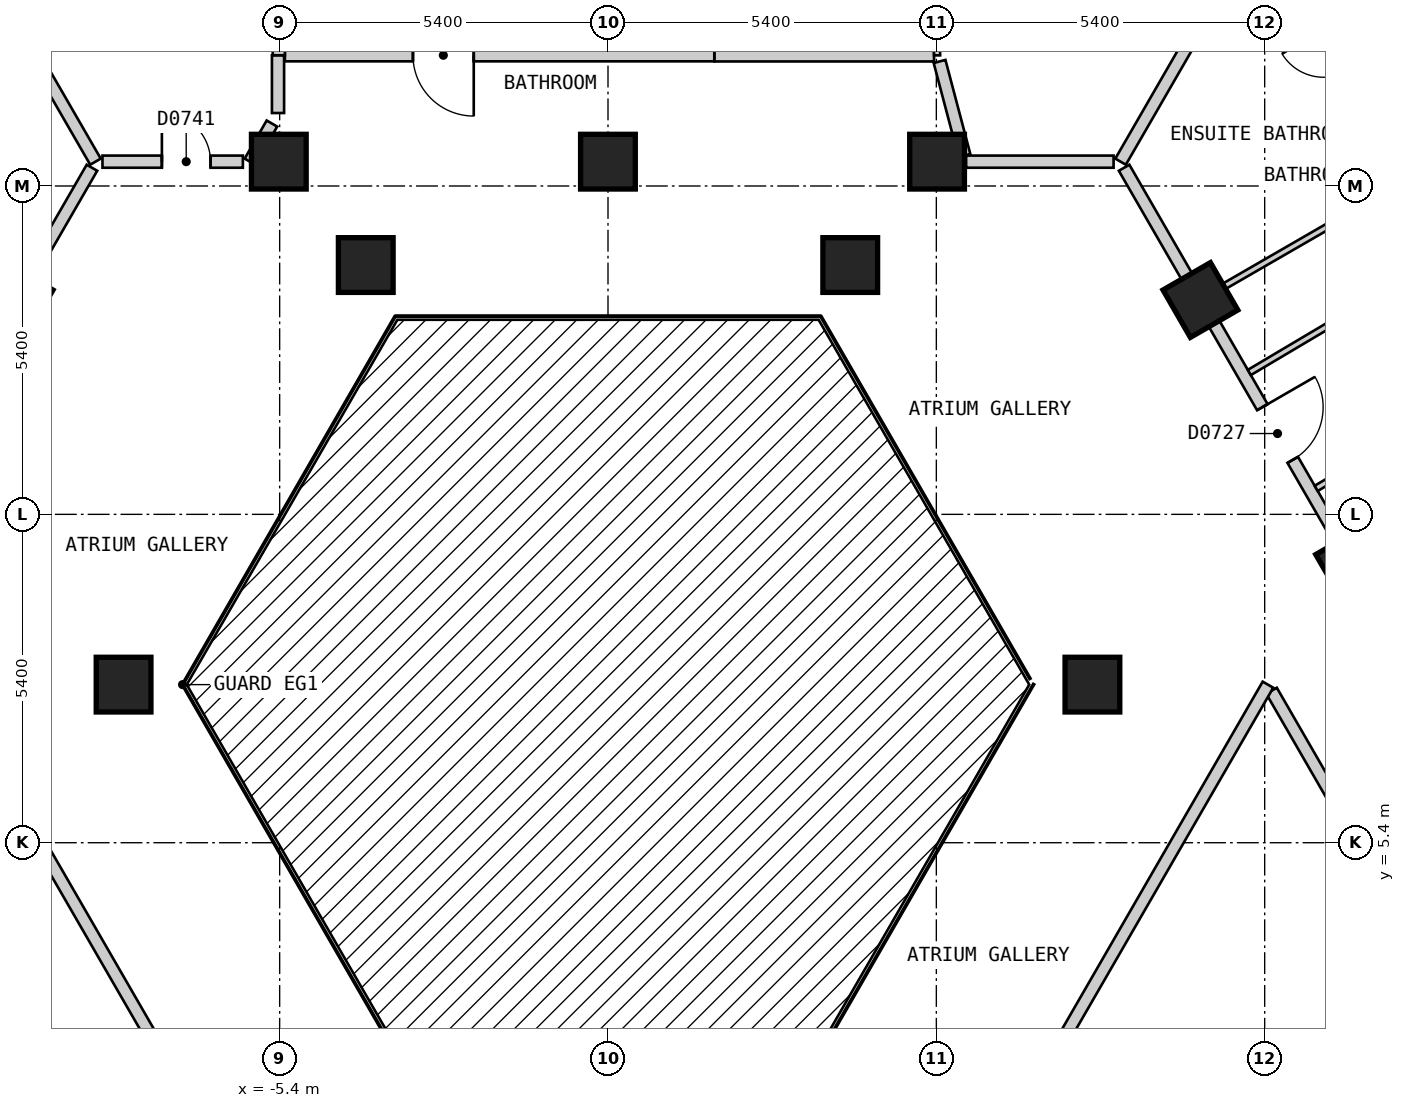
"""IFC4 building model, lengths in metres.
Left out: names, types, materials, properties, quantities, classifications, styles, units other than length and angle.
Written with IfcOpenShell. Run it as: python <this file> out.ifc"""

import sys

from ifc_helpers import new_model, si_unit, direction, frame, frame_2d, origin, origin_2d, place, context, subcontext, project, spatial, rectangle, extrude, element, fill, save


model = new_model("IFC4")
c1 = context("Model", 3, precision=1e-05, world=origin(), true_north=direction((0.0, 1.0)))
c2 = subcontext(c1, "Body", "Model", "MODEL_VIEW")
j1 = project(units=[si_unit("LENGTHUNIT", "METRE"), si_unit("PLANEANGLEUNIT", "RADIAN")], contexts=[c1])
p1 = place(None, origin())
s1 = spatial("IfcSite", under=j1, at=p1, CompositionType="ELEMENT")
p2 = place(p1, origin())
s2 = spatial("IfcBuilding", under=s1, at=p2, CompositionType="ELEMENT")
p3 = place(p2, frame((0.0, 0.0, 105.0)))
s3 = spatial("IfcBuildingStorey", under=s2, at=p3, CompositionType="ELEMENT", Elevation=105.0)
for number, where, z_axis, x_axis in (
    (1, (12.255, 9.975, 0.0), (0.0, 0.0, 1.0), (-0.5, 0.866, 0.0)),
    (2, (7.967, 8.0, 0.0), (0.0, 0.0, 1.0), (1.0, 0.0, 0.0)),
    (3, (9.743, 14.325, 0.0), (0.0, 0.0, 1.0), (-0.5, 0.866, 0.0)),
    (4, (5.412, 16.6, 0.0), (0.0, 0.0, 1.0), (-1.0, 0.0, 0.0)),
    (5, (3.984, 14.9, 0.0), (0.0, 0.0, 1.0), (1.0, 0.0, 0.0)),
    (6, (-0.001, 16.6, 0.0), (0.0, 0.0, 1.0), (-1.0, 0.0, 0.0)),
    (7, (-3.984, 14.9, 0.0), (0.0, 0.0, 1.0), (1.0, 0.0, 0.0)),
    (8, (-5.414, 16.6, 0.0), (0.0, 0.0, 1.0), (-1.0, 0.0, 0.0)),
    (9, (-9.743, 14.325, 0.0), (0.0, 0.0, 1.0), (-0.5, -0.866, 0.0)),
    (10, (-7.967, 8.0, 0.0), (0.0, 0.0, 1.0), (1.0, 0.0, 0.0)),
):
    element("IfcColumn", number, at=place(p3, frame(where, z_axis=z_axis, x_axis=x_axis)), inside=s3, PredefinedType="COLUMN", context=c2, shape_type="SweptSolid", body=[
        extrude(rectangle(XDim=0.9, YDim=0.9, at=origin_2d()), origin(), (0.0, 0.0, 1.0), 3.0),
    ])
p4 = place(p3, frame((-10.796, 7.899, 0.0), z_axis=(0.0, 0.0, 1.0), x_axis=(0.500010383074, -0.866019409031, 0.0)))
e11 = element("IfcWall", 11, at=p4, inside=s3, PredefinedType="PARTITIONING", context=c2, shape_type="SweptSolid", body=[
    extrude(rectangle(XDim=7.535, YDim=0.2, at=frame_2d((3.768, 0.0))), origin(), (0.0, 0.0, 1.0), 2.6),
])
p5 = place(p3, frame((5.453, 18.248, 0.0), z_axis=(0.0, 0.0, 1.0), x_axis=(0.255687088482, -0.9667595941, 0.0)))
e12 = element("IfcWall", 12, at=p5, inside=s3, PredefinedType="PARTITIONING", context=c2, shape_type="SweptSolid", body=[
    extrude(rectangle(XDim=1.6, YDim=0.2, at=frame_2d((0.8, 0.0))), origin(), (0.0, 0.0, 1.0), 2.6),
])
p6 = place(p3, frame((10.913, 7.899, 0.0), z_axis=(0.0, 0.0, 1.0), x_axis=(0.500028940566, -0.866008694296, 0.0)))
e13 = element("IfcWall", 13, at=p6, inside=s3, PredefinedType="PARTITIONING", context=c2, shape_type="SweptSolid", body=[
    extrude(rectangle(XDim=10.159, YDim=0.2, at=frame_2d((5.08, 0.0))), origin(), (0.0, 0.0, 1.0), 2.6),
])
p7 = place(p6, frame((4.63, 0.0, 0.0)))
e14 = element("IfcOpeningElement", 14, at=p7, cuts=e13, PredefinedType="OPENING", context=c2, shape_type="SweptSolid", body=[
    extrude(rectangle(XDim=0.9, YDim=2.1, at=frame_2d((0.45, 1.05))), frame((0.0, 0.11, 0.0), z_axis=(0.0, -1.0, 0.0), x_axis=(1.0, 0.0, 0.0)), (0.0, 0.0, 1.0), 0.22),
])
p8 = place(p3, frame((8.488, 16.5, 0.0), z_axis=(0.0, 0.0, 1.0), x_axis=(0.499986836607, -0.86603300354, 0.0)))
e15 = element("IfcWall", 15, at=p8, inside=s3, PredefinedType="PARTITIONING", context=c2, shape_type="SweptSolid", body=[
    extrude(rectangle(XDim=20.09, YDim=0.2, at=frame_2d((10.045, 0.0))), origin(), (0.0, 0.0, 1.0), 2.6),
])
p9 = place(p8, frame((14.569, 0.0, 0.0)))
e16 = element("IfcOpeningElement", 16, at=p9, cuts=e15, PredefinedType="OPENING", context=c2, shape_type="SweptSolid", body=[
    extrude(rectangle(XDim=1.0, YDim=2.1, at=frame_2d((0.5, 1.05))), frame((0.0, 0.11, 0.0), z_axis=(0.0, -1.0, 0.0), x_axis=(1.0, 0.0, 0.0)), (0.0, 0.0, 1.0), 0.22),
])
p10 = place(p8, frame((4.547, 0.0, 0.0)))
e17 = element("IfcOpeningElement", 17, at=p10, cuts=e15, PredefinedType="OPENING", context=c2, shape_type="SweptSolid", body=[
    extrude(rectangle(XDim=1.0, YDim=2.1, at=frame_2d((0.5, 1.05))), frame((0.0, 0.11, 0.0), z_axis=(0.0, -1.0, 0.0), x_axis=(1.0, 0.0, 0.0)), (0.0, 0.0, 1.0), 0.22),
])
p11 = place(p3, frame((-8.314, 16.6, 0.0), z_axis=(0.0, 0.0, 1.0), x_axis=(1.0, 0.0, 0.0)))
e18 = element("IfcWall", 18, at=p11, inside=s3, PredefinedType="PARTITIONING", context=c2, shape_type="SweptSolid", body=[
    extrude(rectangle(XDim=2.309, YDim=0.2, at=frame_2d((1.155, 0.0))), origin(), (0.0, 0.0, 1.0), 2.6),
])
p12 = place(p11, frame((0.977, 0.0, 0.0)))
e19 = element("IfcOpeningElement", 19, at=p12, cuts=e18, PredefinedType="OPENING", context=c2, shape_type="SweptSolid", body=[
    extrude(rectangle(XDim=0.8, YDim=2.1, at=frame_2d((0.4, 1.05))), frame((0.0, 0.11, 0.0), z_axis=(0.0, -1.0, 0.0), x_axis=(1.0, 0.0, 0.0)), (0.0, 0.0, 1.0), 0.22),
])
p13 = place(p3, frame((5.889, 16.6, 0.0), z_axis=(0.0, 0.0, 1.0), x_axis=(1.0, 0.0, 0.0)))
e20 = element("IfcWall", 20, at=p13, inside=s3, PredefinedType="PARTITIONING", context=c2, shape_type="SweptSolid", body=[
    extrude(rectangle(XDim=2.426, YDim=0.2, at=frame_2d((1.213, 0.0))), origin(), (0.0, 0.0, 1.0), 2.6),
])
p14 = place(p3, frame((1.75, 18.348, 0.0), z_axis=(0.0, 0.0, 1.0), x_axis=(1.0, 0.0, 0.0)))
e21 = element("IfcWall", 21, at=p14, inside=s3, PredefinedType="PARTITIONING", context=c2, shape_type="SweptSolid", body=[
    extrude(rectangle(XDim=3.612, YDim=0.2, at=frame_2d((1.806, 0.0))), origin(), (0.0, 0.0, 1.0), 2.6),
])
p15 = place(p3, frame((-5.314, 18.35, 0.0), z_axis=(0.0, 0.0, 1.0), x_axis=(1.0, 0.0, 0.0)))
e22 = element("IfcWall", 22, at=p15, inside=s3, PredefinedType="PARTITIONING", context=c2, shape_type="SweptSolid", body=[
    extrude(rectangle(XDim=7.062, YDim=0.2, at=frame_2d((3.531, 0.0))), origin(), (0.0, 0.0, 1.0), 2.6),
])
p16 = place(p15, frame((2.106, 0.0, 0.0)))
e23 = element("IfcOpeningElement", 23, at=p16, cuts=e22, PredefinedType="OPENING", context=c2, shape_type="SweptSolid", body=[
    extrude(rectangle(XDim=1.0, YDim=2.1, at=frame_2d((0.5, 1.05))), frame((0.0, 0.11, 0.0), z_axis=(0.0, -1.0, 0.0), x_axis=(1.0, 0.0, 0.0)), (0.0, 0.0, 1.0), 0.22),
])
p17 = place(p3, frame((6.928, 1.2, 0.0), z_axis=(0.0, 0.0, 1.0), x_axis=(0.500055327065, 0.865993458332, 0.0)))
e24 = element("IfcWall", 24, at=p17, inside=s3, PredefinedType="PARTITIONING", context=c2, shape_type="SweptSolid", body=[
    extrude(rectangle(XDim=7.851, YDim=0.2, at=frame_2d((3.926, 0.0))), origin(), (0.0, 0.0, 1.0), 2.6),
])
p18 = place(p3, frame((-5.889, 16.6, 0.0), z_axis=(0.0, 0.0, 1.0), x_axis=(0.499839240638, 0.866118198353, 0.0)))
e25 = element("IfcWall", 25, at=p18, inside=s3, PredefinedType="PARTITIONING", context=c2, shape_type="SweptSolid", body=[
    extrude(rectangle(XDim=0.724, YDim=0.2, at=frame_2d((0.362, 0.0))), origin(), (0.0, 0.0, 1.0), 2.6),
])
p19 = place(p3, frame((-18.533, -0.901, 0.0), z_axis=(0.0, 0.0, 1.0), x_axis=(0.499981198768, 0.866036258409, 0.0)))
e26 = element("IfcWall", 26, at=p19, inside=s3, PredefinedType="PARTITIONING", context=c2, shape_type="SweptSolid", body=[
    extrude(rectangle(XDim=20.093, YDim=0.2, at=frame_2d((10.046, 0.0))), origin(), (0.0, 0.0, 1.0), 2.6),
])
p20 = place(p19, frame((14.57, 0.0, 0.0)))
e27 = element("IfcOpeningElement", 27, at=p20, cuts=e26, PredefinedType="OPENING", context=c2, shape_type="SweptSolid", body=[
    extrude(rectangle(XDim=1.0, YDim=2.1, at=frame_2d((0.5, 1.05))), frame((0.0, 0.11, 0.0), z_axis=(0.0, -1.0, 0.0), x_axis=(1.0, 0.0, 0.0)), (0.0, 0.0, 1.0), 0.22),
])
p21 = place(p19, frame((4.523, 0.0, 0.0)))
e28 = element("IfcOpeningElement", 28, at=p21, cuts=e26, PredefinedType="OPENING", context=c2, shape_type="SweptSolid", body=[
    extrude(rectangle(XDim=1.0, YDim=2.1, at=frame_2d((0.5, 1.05))), frame((0.0, 0.11, 0.0), z_axis=(0.0, -1.0, 0.0), x_axis=(1.0, 0.0, 0.0)), (0.0, 0.0, 1.0), 0.22),
])
p22 = place(p3, frame((-5.427, 17.4, 0.0), z_axis=(0.0, 0.0, 1.0), x_axis=(0.0, 1.0, 0.0)))
e29 = element("IfcWall", 29, at=p22, inside=s3, PredefinedType="PARTITIONING", context=c2, shape_type="SweptSolid", body=[
    extrude(rectangle(XDim=0.95, YDim=0.2, at=frame_2d((0.475, 0.0))), origin(), (0.0, 0.0, 1.0), 2.6),
])
p23 = place(p3, frame((10.706, 20.543, 0.0), z_axis=(0.0, 0.0, 1.0), x_axis=(0.518240414093, -0.855234981278, 0.0)))
e30 = element("IfcWall", 30, at=p23, inside=s3, PredefinedType="PARTITIONING", context=c2, shape_type="SweptSolid", body=[
    extrude(rectangle(XDim=4.855, YDim=0.1, at=frame_2d((2.427, 0.0))), origin(), (0.0, 0.0, 1.0), 2.6),
])
p24 = place(p23, frame((2.052, 0.0, 0.0)))
e31 = element("IfcOpeningElement", 31, at=p24, cuts=e30, PredefinedType="OPENING", context=c2, shape_type="SweptSolid", body=[
    extrude(rectangle(XDim=0.8, YDim=2.1, at=frame_2d((0.4, 1.05))), frame((0.0, 0.06, 0.0), z_axis=(0.0, -1.0, 0.0), x_axis=(1.0, 0.0, 0.0)), (0.0, 0.0, 1.0), 0.12),
])
p25 = place(p3, frame((5.412, 22.005, 0.0), z_axis=(0.0, 0.0, 1.0), x_axis=(0.0, -1.0, 0.0)))
e32 = element("IfcWall", 32, at=p25, inside=s3, PredefinedType="PARTITIONING", context=c2, shape_type="SweptSolid", body=[
    extrude(rectangle(XDim=3.657, YDim=0.1, at=frame_2d((1.829, 0.0))), origin(), (0.0, 0.0, 1.0), 2.6),
])
p26 = place(p3, frame((9.83, 14.375, 0.0), z_axis=(0.0, 0.0, 1.0), x_axis=(0.866016855193, 0.500014806302, 0.0)))
e33 = element("IfcWall", 33, at=p26, inside=s3, PredefinedType="PARTITIONING", context=c2, shape_type="SweptSolid", body=[
    extrude(rectangle(XDim=10.0, YDim=0.1, at=frame_2d((5.0, 0.0))), origin(), (0.0, 0.0, 1.0), 2.6),
])
p27 = place(p26, frame((6.523, 0.0, 0.0)))
e34 = element("IfcOpeningElement", 34, at=p27, cuts=e33, PredefinedType="OPENING", context=c2, shape_type="SweptSolid", body=[
    extrude(rectangle(XDim=0.9, YDim=2.1, at=frame_2d((0.45, 1.05))), frame((0.0, 0.06, 0.0), z_axis=(0.0, -1.0, 0.0), x_axis=(1.0, 0.0, 0.0)), (0.0, 0.0, 1.0), 0.12),
])
p28 = place(p3, frame((11.647, 11.227, 0.0), z_axis=(0.0, 0.0, 1.0), x_axis=(0.859997349349, 0.510298500011, 0.0)))
e35 = element("IfcWall", 35, at=p28, inside=s3, PredefinedType="PARTITIONING", context=c2, shape_type="SweptSolid", body=[
    extrude(rectangle(XDim=3.898, YDim=0.1, at=frame_2d((1.949, 0.0))), origin(), (0.0, 0.0, 1.0), 2.6),
])
p29 = place(p28, frame((1.473, 0.0, 0.0)))
e36 = element("IfcOpeningElement", 36, at=p29, cuts=e35, PredefinedType="OPENING", context=c2, shape_type="SweptSolid", body=[
    extrude(rectangle(XDim=0.9, YDim=2.1, at=frame_2d((0.45, 1.05))), frame((0.0, 0.06, 0.0), z_axis=(0.0, -1.0, 0.0), x_axis=(1.0, 0.0, 0.0)), (0.0, 0.0, 1.0), 0.12),
])
p30 = place(p3, frame((10.547, 13.133, 0.0), z_axis=(0.0, 0.0, 1.0), x_axis=(0.860090994311, 0.510140648749, 0.0)))
e37 = element("IfcWall", 37, at=p30, inside=s3, PredefinedType="PARTITIONING", context=c2, shape_type="SweptSolid", body=[
    extrude(rectangle(XDim=3.897, YDim=0.1, at=frame_2d((1.948, 0.0))), origin(), (0.0, 0.0, 1.0), 2.6),
])
p31 = place(p30, frame((1.523, 0.0, 0.0)))
e38 = element("IfcOpeningElement", 38, at=p31, cuts=e37, PredefinedType="OPENING", context=c2, shape_type="SweptSolid", body=[
    extrude(rectangle(XDim=0.8, YDim=2.1, at=frame_2d((0.4, 1.05))), frame((0.0, 0.06, 0.0), z_axis=(0.0, -1.0, 0.0), x_axis=(1.0, 0.0, 0.0)), (0.0, 0.0, 1.0), 0.12),
])
p32 = place(p3, frame((-10.727, 20.58, 0.0), z_axis=(0.0, 0.0, 1.0), x_axis=(0.500041272028, -0.866001574057, 0.0)))
e39 = element("IfcWall", 39, at=p32, inside=s3, PredefinedType="PARTITIONING", context=c2, shape_type="SweptSolid", body=[
    extrude(rectangle(XDim=4.596, YDim=0.2, at=frame_2d((2.298, 0.0))), origin(), (0.0, 0.0, 1.0), 2.6),
])
p33 = place(p3, frame((-5.414, 26.7, 0.0), z_axis=(0.0, 0.0, 1.0), x_axis=(0.0, -1.0, 0.0)))
e40 = element("IfcWall", 40, at=p33, inside=s3, PredefinedType="PARTITIONING", context=c2, shape_type="SweptSolid", body=[
    extrude(rectangle(XDim=8.35, YDim=0.2, at=frame_2d((4.175, 0.0))), origin(), (0.0, 0.0, 1.0), 2.6),
])
p34 = place(p3, frame((8.43, 16.6, 0.0), z_axis=(0.0, 0.0, 1.0), x_axis=(0.500072613115, 0.865983476524, 0.0)))
e41 = element("IfcWall", 41, at=p34, inside=s3, PredefinedType="PARTITIONING", context=c2, shape_type="SweptSolid", body=[
    extrude(rectangle(XDim=4.385, YDim=0.2, at=frame_2d((2.193, 0.0))), origin(), (0.0, 0.0, 1.0), 2.6),
])
p35 = place(p10, origin())
e42 = element("IfcDoor", 42, at=p35, inside=s3, OperationType="SINGLE_SWING_LEFT", PredefinedType="DOOR", context=c2, shape_type="SweptSolid", body=[
    extrude(rectangle(XDim=1.0, YDim=2.1, at=frame_2d((0.5, 1.05))), frame((0.0, 0.025, 0.0), z_axis=(0.0, -1.0, 0.0), x_axis=(1.0, 0.0, 0.0)), (0.0, 0.0, 1.0), 0.05),
])
fill(e17, e42)
p36 = place(p24, origin())
e43 = element("IfcDoor", 43, at=p36, inside=s3, OperationType="SINGLE_SWING_LEFT", PredefinedType="DOOR", context=c2, shape_type="SweptSolid", body=[
    extrude(rectangle(XDim=0.8, YDim=2.1, at=frame_2d((0.4, 1.05))), frame((0.0, 0.025, 0.0), z_axis=(0.0, -1.0, 0.0), x_axis=(1.0, 0.0, 0.0)), (0.0, 0.0, 1.0), 0.05),
])
fill(e31, e43)
p37 = place(p16, origin())
e44 = element("IfcDoor", 44, at=p37, inside=s3, OperationType="SINGLE_SWING_RIGHT", PredefinedType="DOOR", context=c2, shape_type="SweptSolid", body=[
    extrude(rectangle(XDim=1.0, YDim=2.1, at=frame_2d((0.5, 1.05))), frame((0.0, 0.025, 0.0), z_axis=(0.0, -1.0, 0.0), x_axis=(1.0, 0.0, 0.0)), (0.0, 0.0, 1.0), 0.05),
])
fill(e23, e44)
p38 = place(p12, origin())
e45 = element("IfcDoor", 45, at=p38, inside=s3, OperationType="SINGLE_SWING_LEFT", PredefinedType="DOOR", context=c2, shape_type="SweptSolid", body=[
    extrude(rectangle(XDim=0.8, YDim=2.1, at=frame_2d((0.4, 1.05))), frame((0.0, 0.025, 0.0), z_axis=(0.0, -1.0, 0.0), x_axis=(1.0, 0.0, 0.0)), (0.0, 0.0, 1.0), 0.05),
])
fill(e19, e45)
save(model, sys.argv[1])
